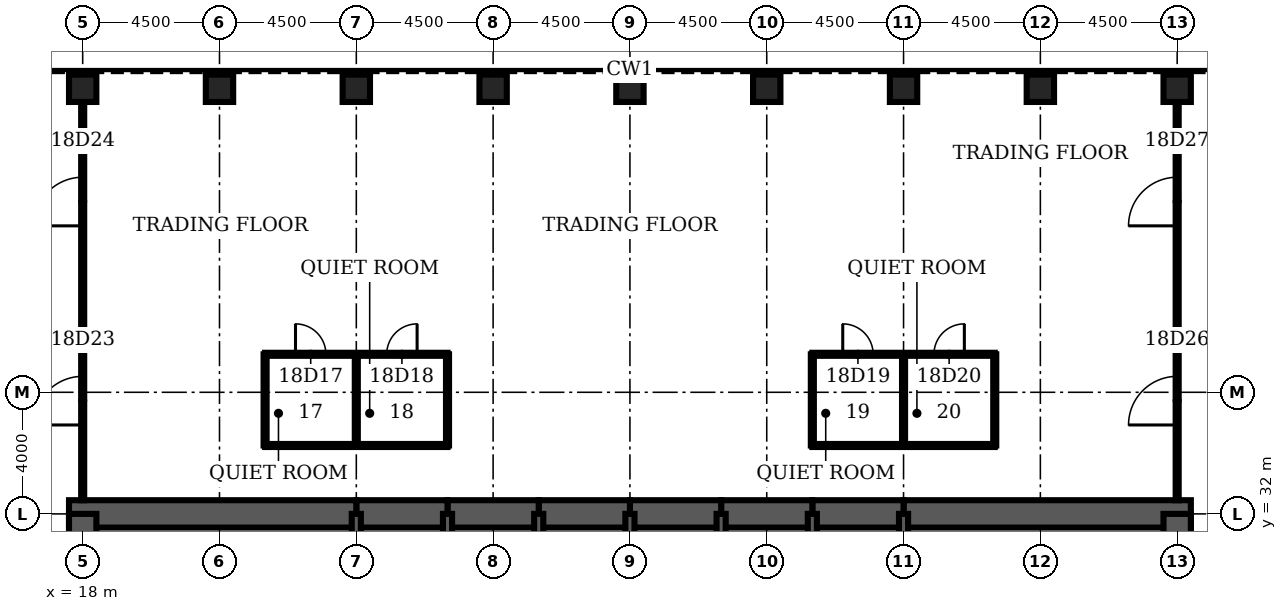
"""IFC4 building model, lengths in metres.
Left out: names, types, materials, properties, quantities, classifications, styles, units other than length and angle.
Written with IfcOpenShell. Run it as: python <this file> out.ifc"""

import sys

from ifc_helpers import new_model, si_unit, direction, frame, frame_2d, origin, origin_2d, place, context, subcontext, project, spatial, rectangle, hollow_rectangle, extrude, element, fill, save


model = new_model("IFC4")
c1 = context("Model", 3, precision=1e-05, world=origin(), true_north=direction((0.0, 1.0)))
c2 = subcontext(c1, "Body", "Model", "MODEL_VIEW")
j1 = project(units=[si_unit("LENGTHUNIT", "METRE"), si_unit("PLANEANGLEUNIT", "RADIAN")], contexts=[c1])
p1 = place(None, origin())
s1 = spatial("IfcSite", under=j1, at=p1, CompositionType="ELEMENT")
p2 = place(p1, origin())
s2 = spatial("IfcBuilding", under=s1, at=p2, CompositionType="ELEMENT")
p3 = place(p2, frame((0.0, 0.0, 86.0)))
s3 = spatial("IfcBuildingStorey", under=s2, at=p3, CompositionType="ELEMENT", Elevation=86.0)
for number, where, z_axis, x_axis in (
    (1, (54.0, 46.0, 0.0), (0.0, 0.0, 1.0), (0.0, 1.0, 0.0)),
    (2, (49.5, 46.0, 0.0), (0.0, 0.0, 1.0), (0.0, 1.0, 0.0)),
    (3, (45.0, 46.0, 0.0), (0.0, 0.0, 1.0), (0.0, 1.0, 0.0)),
    (4, (40.5, 46.0, 0.0), (0.0, 0.0, 1.0), (0.0, 1.0, 0.0)),
    (5, (36.0, 46.0, 0.0), (0.0, 0.0, 1.0), (0.0, 1.0, 0.0)),
    (6, (31.5, 46.0, 0.0), (0.0, 0.0, 1.0), (0.0, 1.0, 0.0)),
    (7, (27.0, 46.0, 0.0), (0.0, 0.0, 1.0), (0.0, 1.0, 0.0)),
    (8, (22.5, 46.0, 0.0), (0.0, 0.0, 1.0), (0.0, 1.0, 0.0)),
    (9, (18.0, 46.0, 0.0), (0.0, 0.0, 1.0), (0.0, 1.0, 0.0)),
):
    element("IfcColumn", number, at=place(p3, frame(where, z_axis=z_axis, x_axis=x_axis)), inside=s3, PredefinedType="COLUMN", context=c2, shape_type="SweptSolid", body=[
        extrude(hollow_rectangle(XDim=0.9, YDim=0.9, WallThickness=0.11, at=origin_2d()), origin(), (0.0, 0.0, 1.0), 4.5),
    ])
p4 = place(p3, frame((54.45, 32.0, 0.0), z_axis=(0.0, 0.0, 1.0), x_axis=(-1.0, 0.0, 0.0)))
e10 = element("IfcWall", 10, at=p4, inside=s3, PredefinedType="SHEAR", context=c2, shape_type="SweptSolid", body=[
    extrude(rectangle(XDim=9.45, YDim=0.9, at=frame_2d((4.725, 0.0))), origin(), (0.0, 0.0, 1.0), 4.5),
])
for number, where, z_axis, x_axis in (
    (11, (45.0, 32.0, 0.0), (0.0, 0.0, 1.0), (-1.0, 0.0, 0.0)),
    (12, (42.0, 32.0, 0.0), (0.0, 0.0, 1.0), (-1.0, 0.0, 0.0)),
    (13, (39.0, 32.0, 0.0), (0.0, 0.0, 1.0), (-1.0, 0.0, 0.0)),
    (14, (36.0, 32.0, 0.0), (0.0, 0.0, 1.0), (-1.0, 0.0, 0.0)),
    (15, (33.0, 32.0, 0.0), (0.0, 0.0, 1.0), (-1.0, 0.0, 0.0)),
    (16, (30.0, 32.0, 0.0), (0.0, 0.0, 1.0), (-1.0, 0.0, 0.0)),
):
    element("IfcWall", number, at=place(p3, frame(where, z_axis=z_axis, x_axis=x_axis)), inside=s3, PredefinedType="SHEAR", context=c2, shape_type="SweptSolid", body=[
        extrude(rectangle(XDim=3.0, YDim=0.9, at=frame_2d((1.5, 0.0))), origin(), (0.0, 0.0, 1.0), 4.5),
    ])
p5 = place(p3, frame((27.0, 32.0, 0.0), z_axis=(0.0, 0.0, 1.0), x_axis=(-1.0, 0.0, 0.0)))
e17 = element("IfcWall", 17, at=p5, inside=s3, PredefinedType="SHEAR", context=c2, shape_type="SweptSolid", body=[
    extrude(rectangle(XDim=9.45, YDim=0.9, at=frame_2d((4.725, 0.0))), origin(), (0.0, 0.0, 1.0), 4.5),
])
for number, where, z_axis, x_axis in (
    (18, (18.0, 32.0, 0.0), (0.0, 0.0, 1.0), (0.0, -1.0, 0.0)),
    (19, (54.0, 28.8, 0.0), (0.0, 0.0, 1.0), (0.0, 1.0, 0.0)),
):
    element("IfcWall", number, at=place(p3, frame(where, z_axis=z_axis, x_axis=x_axis)), inside=s3, PredefinedType="SHEAR", context=c2, shape_type="SweptSolid", body=[
        extrude(rectangle(XDim=3.2, YDim=0.9, at=frame_2d((1.6, 0.0))), origin(), (0.0, 0.0, 1.0), 4.5),
    ])
for number, where, z_axis, x_axis in (
    (20, (27.0, 28.8, 0.0), (0.0, 0.0, 1.0), (0.0, 1.0, 0.0)),
    (21, (30.0, 28.8, 0.0), (0.0, 0.0, 1.0), (0.0, 1.0, 0.0)),
    (22, (33.0, 28.8, 0.0), (0.0, 0.0, 1.0), (0.0, 1.0, 0.0)),
    (23, (36.0, 28.8, 0.0), (0.0, 0.0, 1.0), (0.0, 1.0, 0.0)),
    (24, (39.0, 28.8, 0.0), (0.0, 0.0, 1.0), (0.0, 1.0, 0.0)),
    (25, (42.0, 28.8, 0.0), (0.0, 0.0, 1.0), (0.0, 1.0, 0.0)),
    (26, (45.0, 28.8, 0.0), (0.0, 0.0, 1.0), (0.0, 1.0, 0.0)),
):
    element("IfcWall", number, at=place(p3, frame(where, z_axis=z_axis, x_axis=x_axis)), inside=s3, PredefinedType="SOLIDWALL", context=c2, shape_type="SweptSolid", body=[
        extrude(rectangle(XDim=3.2, YDim=0.3, at=frame_2d((1.6, 0.0))), origin(), (0.0, 0.0, 1.0), 4.5),
    ])
for number, where, z_axis, x_axis in (
    (27, (24.0, 34.25, 0.0), (0.0, 0.0, 1.0), (1.0, 0.0, 0.0)),
    (28, (42.0, 34.25, 0.0), (0.0, 0.0, 1.0), (1.0, 0.0, 0.0)),
):
    element("IfcWall", number, at=place(p3, frame(where, z_axis=z_axis, x_axis=x_axis)), inside=s3, PredefinedType="PARTITIONING", context=c2, shape_type="SweptSolid", body=[
        extrude(rectangle(XDim=6.0, YDim=0.1, at=frame_2d((3.0, 0.0))), origin(), (0.0, 0.0, 1.0), 3.0),
    ])
p6 = place(p3, frame((24.0, 37.25, 0.0), z_axis=(0.0, 0.0, 1.0), x_axis=(1.0, 0.0, 0.0)))
e29 = element("IfcWall", 29, at=p6, inside=s3, PredefinedType="PARTITIONING", context=c2, shape_type="SweptSolid", body=[
    extrude(rectangle(XDim=6.0, YDim=0.1, at=frame_2d((3.0, 0.0))), origin(), (0.0, 0.0, 1.0), 3.0),
])
p7 = place(p6, frame((1.0, 0.0, 0.0)))
e30 = element("IfcOpeningElement", 30, at=p7, cuts=e29, PredefinedType="OPENING", context=c2, shape_type="SweptSolid", body=[
    extrude(rectangle(XDim=1.0, YDim=2.1, at=frame_2d((0.5, 1.05))), frame((0.0, 0.06, 0.0), z_axis=(0.0, -1.0, 0.0), x_axis=(1.0, 0.0, 0.0)), (0.0, 0.0, 1.0), 0.12),
])
p8 = place(p6, frame((4.0, 0.0, 0.0)))
e31 = element("IfcOpeningElement", 31, at=p8, cuts=e29, PredefinedType="OPENING", context=c2, shape_type="SweptSolid", body=[
    extrude(rectangle(XDim=1.0, YDim=2.1, at=frame_2d((0.5, 1.05))), frame((0.0, 0.06, 0.0), z_axis=(0.0, -1.0, 0.0), x_axis=(1.0, 0.0, 0.0)), (0.0, 0.0, 1.0), 0.12),
])
p9 = place(p3, frame((42.0, 37.25, 0.0), z_axis=(0.0, 0.0, 1.0), x_axis=(1.0, 0.0, 0.0)))
e32 = element("IfcWall", 32, at=p9, inside=s3, PredefinedType="PARTITIONING", context=c2, shape_type="SweptSolid", body=[
    extrude(rectangle(XDim=6.0, YDim=0.1, at=frame_2d((3.0, 0.0))), origin(), (0.0, 0.0, 1.0), 3.0),
])
p10 = place(p9, frame((1.0, 0.0, 0.0)))
e33 = element("IfcOpeningElement", 33, at=p10, cuts=e32, PredefinedType="OPENING", context=c2, shape_type="SweptSolid", body=[
    extrude(rectangle(XDim=1.0, YDim=2.1, at=frame_2d((0.5, 1.05))), frame((0.0, 0.06, 0.0), z_axis=(0.0, -1.0, 0.0), x_axis=(1.0, 0.0, 0.0)), (0.0, 0.0, 1.0), 0.12),
])
p11 = place(p9, frame((4.0, 0.0, 0.0)))
e34 = element("IfcOpeningElement", 34, at=p11, cuts=e32, PredefinedType="OPENING", context=c2, shape_type="SweptSolid", body=[
    extrude(rectangle(XDim=1.0, YDim=2.1, at=frame_2d((0.5, 1.05))), frame((0.0, 0.06, 0.0), z_axis=(0.0, -1.0, 0.0), x_axis=(1.0, 0.0, 0.0)), (0.0, 0.0, 1.0), 0.12),
])
p12 = place(p3, frame((18.0, 32.45, 0.0), z_axis=(0.0, 0.0, 1.0), x_axis=(0.0, 1.0, 0.0)))
e35 = element("IfcWall", 35, at=p12, inside=s3, PredefinedType="PARTITIONING", context=c2, shape_type="SweptSolid", body=[
    extrude(rectangle(XDim=13.1, YDim=0.1, at=frame_2d((6.55, 0.0))), origin(), (0.0, 0.0, 1.0), 3.0),
])
p13 = place(p12, frame((2.475, 0.0, 0.0)))
e36 = element("IfcOpeningElement", 36, at=p13, cuts=e35, PredefinedType="OPENING", context=c2, shape_type="SweptSolid", body=[
    extrude(rectangle(XDim=1.6, YDim=2.1, at=frame_2d((0.8, 1.05))), frame((0.0, 0.06, 0.0), z_axis=(0.0, -1.0, 0.0), x_axis=(1.0, 0.0, 0.0)), (0.0, 0.0, 1.0), 0.12),
])
p14 = place(p12, frame((9.025, 0.0, 0.0)))
e37 = element("IfcOpeningElement", 37, at=p14, cuts=e35, PredefinedType="OPENING", context=c2, shape_type="SweptSolid", body=[
    extrude(rectangle(XDim=1.6, YDim=2.1, at=frame_2d((0.8, 1.05))), frame((0.0, 0.06, 0.0), z_axis=(0.0, -1.0, 0.0), x_axis=(1.0, 0.0, 0.0)), (0.0, 0.0, 1.0), 0.12),
])
for number, where, z_axis, x_axis in (
    (38, (24.0, 34.25, 0.0), (0.0, 0.0, 1.0), (0.0, 1.0, 0.0)),
    (39, (27.0, 34.25, 0.0), (0.0, 0.0, 1.0), (0.0, 1.0, 0.0)),
    (40, (30.0, 34.25, 0.0), (0.0, 0.0, 1.0), (0.0, 1.0, 0.0)),
    (41, (42.0, 34.25, 0.0), (0.0, 0.0, 1.0), (0.0, 1.0, 0.0)),
    (42, (45.0, 34.25, 0.0), (0.0, 0.0, 1.0), (0.0, 1.0, 0.0)),
    (43, (48.0, 34.25, 0.0), (0.0, 0.0, 1.0), (0.0, 1.0, 0.0)),
):
    element("IfcWall", number, at=place(p3, frame(where, z_axis=z_axis, x_axis=x_axis)), inside=s3, PredefinedType="PARTITIONING", context=c2, shape_type="SweptSolid", body=[
        extrude(rectangle(XDim=3.0, YDim=0.1, at=frame_2d((1.5, 0.0))), origin(), (0.0, 0.0, 1.0), 3.0),
    ])
p15 = place(p3, frame((54.0, 32.45, 0.0), z_axis=(0.0, 0.0, 1.0), x_axis=(0.0, 1.0, 0.0)))
e44 = element("IfcWall", 44, at=p15, inside=s3, PredefinedType="PARTITIONING", context=c2, shape_type="SweptSolid", body=[
    extrude(rectangle(XDim=13.1, YDim=0.1, at=frame_2d((6.55, 0.0))), origin(), (0.0, 0.0, 1.0), 3.0),
])
p16 = place(p15, frame((2.475, 0.0, 0.0)))
e45 = element("IfcOpeningElement", 45, at=p16, cuts=e44, PredefinedType="OPENING", context=c2, shape_type="SweptSolid", body=[
    extrude(rectangle(XDim=1.6, YDim=2.1, at=frame_2d((0.8, 1.05))), frame((0.0, 0.06, 0.0), z_axis=(0.0, -1.0, 0.0), x_axis=(1.0, 0.0, 0.0)), (0.0, 0.0, 1.0), 0.12),
])
p17 = place(p15, frame((9.025, 0.0, 0.0)))
e46 = element("IfcOpeningElement", 46, at=p17, cuts=e44, PredefinedType="OPENING", context=c2, shape_type="SweptSolid", body=[
    extrude(rectangle(XDim=1.6, YDim=2.1, at=frame_2d((0.8, 1.05))), frame((0.0, 0.06, 0.0), z_axis=(0.0, -1.0, 0.0), x_axis=(1.0, 0.0, 0.0)), (0.0, 0.0, 1.0), 0.12),
])
p18 = place(p7, origin())
e47 = element("IfcDoor", 47, at=p18, inside=s3, OperationType="SINGLE_SWING_LEFT", PredefinedType="DOOR", context=c2, shape_type="SweptSolid", body=[
    extrude(rectangle(XDim=1.0, YDim=2.1, at=frame_2d((0.5, 1.05))), frame((0.0, 0.025, 0.0), z_axis=(0.0, -1.0, 0.0), x_axis=(1.0, 0.0, 0.0)), (0.0, 0.0, 1.0), 0.05),
])
fill(e30, e47)
p19 = place(p8, origin())
e48 = element("IfcDoor", 48, at=p19, inside=s3, OperationType="SINGLE_SWING_RIGHT", PredefinedType="DOOR", context=c2, shape_type="SweptSolid", body=[
    extrude(rectangle(XDim=1.0, YDim=2.1, at=frame_2d((0.5, 1.05))), frame((0.0, 0.025, 0.0), z_axis=(0.0, -1.0, 0.0), x_axis=(1.0, 0.0, 0.0)), (0.0, 0.0, 1.0), 0.05),
])
fill(e31, e48)
p20 = place(p10, origin())
e49 = element("IfcDoor", 49, at=p20, inside=s3, OperationType="SINGLE_SWING_LEFT", PredefinedType="DOOR", context=c2, shape_type="SweptSolid", body=[
    extrude(rectangle(XDim=1.0, YDim=2.1, at=frame_2d((0.5, 1.05))), frame((0.0, 0.025, 0.0), z_axis=(0.0, -1.0, 0.0), x_axis=(1.0, 0.0, 0.0)), (0.0, 0.0, 1.0), 0.05),
])
fill(e33, e49)
p21 = place(p11, origin())
e50 = element("IfcDoor", 50, at=p21, inside=s3, OperationType="SINGLE_SWING_RIGHT", PredefinedType="DOOR", context=c2, shape_type="SweptSolid", body=[
    extrude(rectangle(XDim=1.0, YDim=2.1, at=frame_2d((0.5, 1.05))), frame((0.0, 0.025, 0.0), z_axis=(0.0, -1.0, 0.0), x_axis=(1.0, 0.0, 0.0)), (0.0, 0.0, 1.0), 0.05),
])
fill(e34, e50)
p22 = place(p13, origin())
e51 = element("IfcDoor", 51, at=p22, inside=s3, OperationType="SINGLE_SWING_LEFT", PredefinedType="DOOR", context=c2, shape_type="SweptSolid", body=[
    extrude(rectangle(XDim=1.6, YDim=2.1, at=frame_2d((0.8, 1.05))), frame((0.0, 0.025, 0.0), z_axis=(0.0, -1.0, 0.0), x_axis=(1.0, 0.0, 0.0)), (0.0, 0.0, 1.0), 0.05),
])
fill(e36, e51)
p23 = place(p14, origin())
e52 = element("IfcDoor", 52, at=p23, inside=s3, OperationType="SINGLE_SWING_LEFT", PredefinedType="DOOR", context=c2, shape_type="SweptSolid", body=[
    extrude(rectangle(XDim=1.6, YDim=2.1, at=frame_2d((0.8, 1.05))), frame((0.0, 0.025, 0.0), z_axis=(0.0, -1.0, 0.0), x_axis=(1.0, 0.0, 0.0)), (0.0, 0.0, 1.0), 0.05),
])
fill(e37, e52)
p24 = place(p16, origin())
e53 = element("IfcDoor", 53, at=p24, inside=s3, OperationType="SINGLE_SWING_LEFT", PredefinedType="DOOR", context=c2, shape_type="SweptSolid", body=[
    extrude(rectangle(XDim=1.6, YDim=2.1, at=frame_2d((0.8, 1.05))), frame((0.0, 0.025, 0.0), z_axis=(0.0, -1.0, 0.0), x_axis=(1.0, 0.0, 0.0)), (0.0, 0.0, 1.0), 0.05),
])
fill(e45, e53)
p25 = place(p17, origin())
e54 = element("IfcDoor", 54, at=p25, inside=s3, OperationType="SINGLE_SWING_LEFT", PredefinedType="DOOR", context=c2, shape_type="SweptSolid", body=[
    extrude(rectangle(XDim=1.6, YDim=2.1, at=frame_2d((0.8, 1.05))), frame((0.0, 0.025, 0.0), z_axis=(0.0, -1.0, 0.0), x_axis=(1.0, 0.0, 0.0)), (0.0, 0.0, 1.0), 0.05),
])
fill(e46, e54)
save(model, sys.argv[1])
